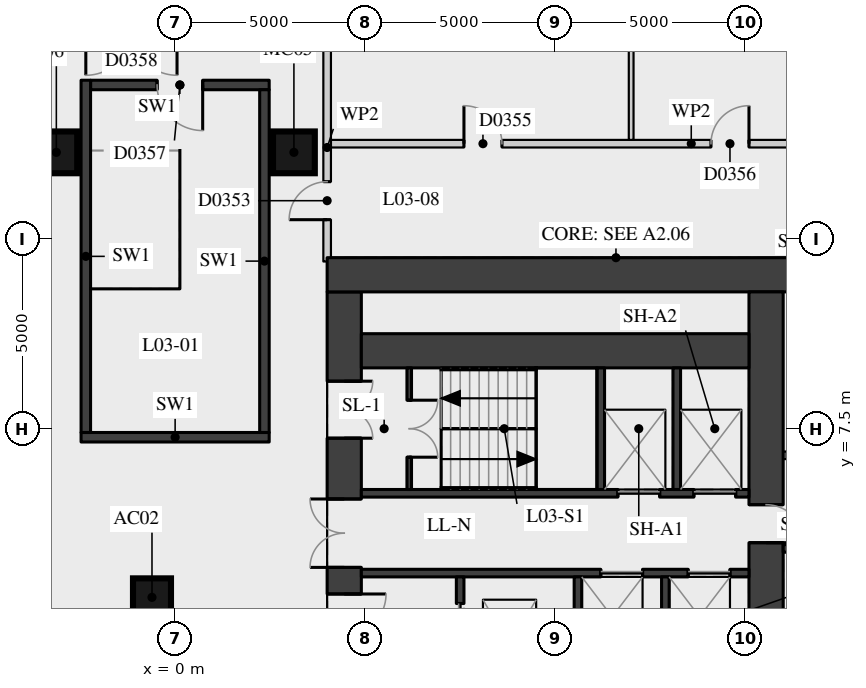
"""IFC4 building model, lengths in metres.
Left out: names, types, materials, properties, quantities, classifications, styles, units other than length and angle.
Written with IfcOpenShell. Run it as: python <this file> out.ifc"""

import sys

from ifc_helpers import new_model, si_unit, direction, frame, frame_2d, origin, origin_2d, place, context, subcontext, project, spatial, rectangle, extrude, element, fill, save


model = new_model("IFC4")
c1 = context("Model", 3, precision=1e-05, world=origin(), true_north=direction((0.0, 1.0)))
c2 = subcontext(c1, "Body", "Model", "MODEL_VIEW")
j1 = project(units=[si_unit("LENGTHUNIT", "METRE"), si_unit("PLANEANGLEUNIT", "RADIAN")], contexts=[c1])
p1 = place(None, origin())
s1 = spatial("IfcSite", under=j1, at=p1, CompositionType="ELEMENT")
p2 = place(p1, origin())
s2 = spatial("IfcBuilding", under=s1, at=p2, CompositionType="ELEMENT")
p3 = place(p2, frame((0.0, 0.0, 17.5)))
s3 = spatial("IfcBuildingStorey", under=s2, at=p3, CompositionType="ELEMENT", Elevation=17.5)
p4 = place(p3, frame((-0.609, 3.062, 0.0), z_axis=(0.0, 0.0, 1.0), x_axis=(1.0, 0.0, 0.0)))
e1 = element("IfcColumn", 1, at=p4, inside=s3, PredefinedType="COLUMN", context=c2, shape_type="SweptSolid", body=[
    extrude(rectangle(XDim=1.0, YDim=1.0, at=origin_2d()), origin(), (0.0, 0.0, 1.0), 4.2),
])
for number, where, z_axis, x_axis in (
    (2, (3.126, 14.772, 0.0), (0.0, 0.0, 1.0), (1.0, 0.0, 0.0)),
    (3, (-3.126, 14.772, 0.0), (0.0, 0.0, 1.0), (1.0, 0.0, 0.0)),
):
    element("IfcColumn", number, at=place(p3, frame(where, z_axis=z_axis, x_axis=x_axis)), inside=s3, PredefinedType="COLUMN", context=c2, shape_type="SweptSolid", body=[
        extrude(rectangle(XDim=1.1, YDim=1.1, at=origin_2d()), origin(), (0.0, 0.0, 1.0), 4.2),
    ])
p5 = place(p3, frame((4.45, -11.1, 0.0), z_axis=(0.0, 0.0, 1.0), x_axis=(0.0, 1.0, 0.0)))
e4 = element("IfcWall", 4, at=p5, inside=s3, PredefinedType="SHEAR", context=c2, shape_type="SweptSolid", body=[
    extrude(rectangle(XDim=22.2, YDim=0.9, at=frame_2d((11.1, 0.0))), origin(), (0.0, 0.0, 1.0), 3.92),
])
p6 = place(p5, frame((2.35, 0.0, 0.0)))
e5 = element("IfcOpeningElement", 5, at=p6, cuts=e4, PredefinedType="OPENING", context=c2, shape_type="SweptSolid", body=[
    extrude(rectangle(XDim=1.5, YDim=2.1, at=frame_2d((0.75, 1.05))), frame((0.0, 0.46, 0.0), z_axis=(0.0, -1.0, 0.0), x_axis=(1.0, 0.0, 0.0)), (0.0, 0.0, 1.0), 0.92),
])
p7 = place(p5, frame((5.45, 0.0, 0.0)))
e6 = element("IfcOpeningElement", 6, at=p7, cuts=e4, PredefinedType="OPENING", context=c2, shape_type="SweptSolid", body=[
    extrude(rectangle(XDim=1.8, YDim=2.1, at=frame_2d((0.9, 1.05))), frame((0.0, 0.46, 0.0), z_axis=(0.0, -1.0, 0.0), x_axis=(1.0, 0.0, 0.0)), (0.0, 0.0, 1.0), 0.92),
])
p8 = place(p5, frame((7.95, 0.0, 0.0)))
e7 = element("IfcOpeningElement", 7, at=p8, cuts=e4, PredefinedType="OPENING", context=c2, shape_type="SweptSolid", body=[
    extrude(rectangle(XDim=1.1, YDim=2.1, at=frame_2d((0.55, 1.05))), frame((0.0, 0.46, 0.0), z_axis=(0.0, -1.0, 0.0), x_axis=(1.0, 0.0, 0.0)), (0.0, 0.0, 1.0), 0.92),
])
p9 = place(p5, frame((10.6, 0.0, 0.0)))
e8 = element("IfcOpeningElement", 8, at=p9, cuts=e4, PredefinedType="OPENING", context=c2, shape_type="SweptSolid", body=[
    extrude(rectangle(XDim=1.0, YDim=2.1, at=frame_2d((0.5, 1.05))), frame((0.0, 0.46, 0.0), z_axis=(0.0, -1.0, 0.0), x_axis=(1.0, 0.0, 0.0)), (0.0, 0.0, 1.0), 0.92),
])
p10 = place(p5, frame((13.15, 0.0, 0.0)))
e9 = element("IfcOpeningElement", 9, at=p10, cuts=e4, PredefinedType="OPENING", context=c2, shape_type="SweptSolid", body=[
    extrude(rectangle(XDim=1.1, YDim=2.1, at=frame_2d((0.55, 1.05))), frame((0.0, 0.46, 0.0), z_axis=(0.0, -1.0, 0.0), x_axis=(1.0, 0.0, 0.0)), (0.0, 0.0, 1.0), 0.92),
])
p11 = place(p5, frame((14.95, 0.0, 0.0)))
e10 = element("IfcOpeningElement", 10, at=p11, cuts=e4, PredefinedType="OPENING", context=c2, shape_type="SweptSolid", body=[
    extrude(rectangle(XDim=1.8, YDim=2.1, at=frame_2d((0.9, 1.05))), frame((0.0, 0.46, 0.0), z_axis=(0.0, -1.0, 0.0), x_axis=(1.0, 0.0, 0.0)), (0.0, 0.0, 1.0), 0.92),
])
p12 = place(p5, frame((18.35, 0.0, 0.0)))
e11 = element("IfcOpeningElement", 11, at=p12, cuts=e4, PredefinedType="OPENING", context=c2, shape_type="SweptSolid", body=[
    extrude(rectangle(XDim=1.5, YDim=2.1, at=frame_2d((0.75, 1.05))), frame((0.0, 0.46, 0.0), z_axis=(0.0, -1.0, 0.0), x_axis=(1.0, 0.0, 0.0)), (0.0, 0.0, 1.0), 0.92),
])
p13 = place(p3, frame((4.0, 11.55, 0.0), z_axis=(0.0, 0.0, 1.0), x_axis=(1.0, 0.0, 0.0)))
e12 = element("IfcWall", 12, at=p13, inside=s3, PredefinedType="SHEAR", context=c2, shape_type="SweptSolid", body=[
    extrude(rectangle(XDim=15.2, YDim=0.9, at=frame_2d((7.6, 0.0))), origin(), (0.0, 0.0, 1.0), 3.92),
])
p14 = place(p3, frame((15.55, -11.1, 0.0), z_axis=(0.0, 0.0, 1.0), x_axis=(0.0, 1.0, 0.0)))
e13 = element("IfcWall", 13, at=p14, inside=s3, PredefinedType="SHEAR", context=c2, shape_type="SweptSolid", body=[
    extrude(rectangle(XDim=22.2, YDim=0.9, at=frame_2d((11.1, 0.0))), origin(), (0.0, 0.0, 1.0), 3.92),
])
p15 = place(p14, frame((15.6, 0.0, 0.0)))
e14 = element("IfcOpeningElement", 14, at=p15, cuts=e13, PredefinedType="OPENING", context=c2, shape_type="SweptSolid", body=[
    extrude(rectangle(XDim=1.0, YDim=2.1, at=frame_2d((0.5, 1.05))), frame((0.0, 0.46, 0.0), z_axis=(0.0, -1.0, 0.0), x_axis=(1.0, 0.0, 0.0)), (0.0, 0.0, 1.0), 0.92),
])
p16 = place(p14, frame((5.6, 0.0, 0.0)))
e15 = element("IfcOpeningElement", 15, at=p16, cuts=e13, PredefinedType="OPENING", context=c2, shape_type="SweptSolid", body=[
    extrude(rectangle(XDim=1.0, YDim=2.1, at=frame_2d((0.5, 1.05))), frame((0.0, 0.46, 0.0), z_axis=(0.0, -1.0, 0.0), x_axis=(1.0, 0.0, 0.0)), (0.0, 0.0, 1.0), 0.92),
])
p17 = place(p3, frame((4.9, 9.55, 0.0), z_axis=(0.0, 0.0, 1.0), x_axis=(1.0, 0.0, 0.0)))
e16 = element("IfcWall", 16, at=p17, inside=s3, PredefinedType="SHEAR", context=c2, shape_type="SweptSolid", body=[
    extrude(rectangle(XDim=10.2, YDim=0.9, at=frame_2d((5.1, 0.0))), origin(), (0.0, 0.0, 1.0), 3.92),
])
p18 = place(p3, frame((4.9, 5.8, 0.0), z_axis=(0.0, 0.0, 1.0), x_axis=(1.0, 0.0, 0.0)))
e17 = element("IfcWall", 17, at=p18, inside=s3, PredefinedType="SHEAR", context=c2, shape_type="SweptSolid", body=[
    extrude(rectangle(XDim=10.2, YDim=0.2, at=frame_2d((5.1, 0.0))), origin(), (0.0, 0.0, 1.0), 3.92),
])
p19 = place(p18, frame((6.75, 0.0, 0.0)))
e18 = element("IfcOpeningElement", 18, at=p19, cuts=e17, PredefinedType="OPENING", context=c2, shape_type="SweptSolid", body=[
    extrude(rectangle(XDim=1.1, YDim=2.1, at=frame_2d((0.55, 1.05))), frame((0.0, 0.11, 0.0), z_axis=(0.0, -1.0, 0.0), x_axis=(1.0, 0.0, 0.0)), (0.0, 0.0, 1.0), 0.22),
])
p20 = place(p18, frame((8.75, 0.0, 0.0)))
e19 = element("IfcOpeningElement", 19, at=p20, cuts=e17, PredefinedType="OPENING", context=c2, shape_type="SweptSolid", body=[
    extrude(rectangle(XDim=1.1, YDim=2.1, at=frame_2d((0.55, 1.05))), frame((0.0, 0.11, 0.0), z_axis=(0.0, -1.0, 0.0), x_axis=(1.0, 0.0, 0.0)), (0.0, 0.0, 1.0), 0.22),
])
p21 = place(p3, frame((4.9, 3.7, 0.0), z_axis=(0.0, 0.0, 1.0), x_axis=(1.0, 0.0, 0.0)))
e20 = element("IfcWall", 20, at=p21, inside=s3, PredefinedType="SHEAR", context=c2, shape_type="SweptSolid", body=[
    extrude(rectangle(XDim=10.2, YDim=0.2, at=frame_2d((5.1, 0.0))), origin(), (0.0, 0.0, 1.0), 3.92),
])
p22 = place(p21, frame((6.3, 0.0, 0.0)))
e21 = element("IfcOpeningElement", 21, at=p22, cuts=e20, PredefinedType="OPENING", context=c2, shape_type="SweptSolid", body=[
    extrude(rectangle(XDim=1.1, YDim=2.1, at=frame_2d((0.55, 1.05))), frame((0.0, 0.11, 0.0), z_axis=(0.0, -1.0, 0.0), x_axis=(1.0, 0.0, 0.0)), (0.0, 0.0, 1.0), 0.22),
])
p23 = place(p21, frame((8.6, 0.0, 0.0)))
e22 = element("IfcOpeningElement", 22, at=p23, cuts=e20, PredefinedType="OPENING", context=c2, shape_type="SweptSolid", body=[
    extrude(rectangle(XDim=1.1, YDim=2.1, at=frame_2d((0.55, 1.05))), frame((0.0, 0.11, 0.0), z_axis=(0.0, -1.0, 0.0), x_axis=(1.0, 0.0, 0.0)), (0.0, 0.0, 1.0), 0.22),
])
for number, where, z_axis, x_axis in (
    (23, (11.2, 5.9, 0.0), (0.0, 0.0, 1.0), (0.0, 1.0, 0.0)),
    (24, (13.2, 5.9, 0.0), (0.0, 0.0, 1.0), (0.0, 1.0, 0.0)),
):
    element("IfcWall", number, at=place(p3, frame(where, z_axis=z_axis, x_axis=x_axis)), inside=s3, PredefinedType="SHEAR", context=c2, shape_type="SweptSolid", body=[
        extrude(rectangle(XDim=3.2, YDim=0.2, at=frame_2d((1.6, 0.0))), origin(), (0.0, 0.0, 1.0), 3.92),
    ])
p24 = place(p3, frame((7.5, 1.1, 0.0), z_axis=(0.0, 0.0, 1.0), x_axis=(0.0, 1.0, 0.0)))
e25 = element("IfcWall", 25, at=p24, inside=s3, PredefinedType="SHEAR", context=c2, shape_type="SweptSolid", body=[
    extrude(rectangle(XDim=2.5, YDim=0.2, at=frame_2d((1.25, 0.0))), origin(), (0.0, 0.0, 1.0), 3.92),
])
p25 = place(p24, frame((0.7, 0.0, 0.0)))
e26 = element("IfcOpeningElement", 26, at=p25, cuts=e25, PredefinedType="OPENING", context=c2, shape_type="SweptSolid", body=[
    extrude(rectangle(XDim=1.1, YDim=2.1, at=frame_2d((0.55, 1.05))), frame((0.0, 0.11, 0.0), z_axis=(0.0, -1.0, 0.0), x_axis=(1.0, 0.0, 0.0)), (0.0, 0.0, 1.0), 0.22),
])
for number, where, z_axis, x_axis in (
    (27, (10.6, 1.1, 0.0), (0.0, 0.0, 1.0), (0.0, 1.0, 0.0)),
    (28, (12.9, 1.1, 0.0), (0.0, 0.0, 1.0), (0.0, 1.0, 0.0)),
):
    element("IfcWall", number, at=place(p3, frame(where, z_axis=z_axis, x_axis=x_axis)), inside=s3, PredefinedType="SHEAR", context=c2, shape_type="SweptSolid", body=[
        extrude(rectangle(XDim=2.5, YDim=0.2, at=frame_2d((1.25, 0.0))), origin(), (0.0, 0.0, 1.0), 3.92),
    ])
p26 = place(p3, frame((6.16, 5.9, 0.0), z_axis=(0.0, 0.0, 1.0), x_axis=(0.0, 1.0, 0.0)))
e29 = element("IfcWall", 29, at=p26, inside=s3, PredefinedType="SHEAR", context=c2, shape_type="SweptSolid", body=[
    extrude(rectangle(XDim=3.2, YDim=0.12, at=frame_2d((1.6, 0.0))), origin(), (0.0, 0.0, 1.0), 3.92),
])
p27 = place(p26, frame((0.85, 0.0, 0.0)))
e30 = element("IfcOpeningElement", 30, at=p27, cuts=e29, PredefinedType="OPENING", context=c2, shape_type="SweptSolid", body=[
    extrude(rectangle(XDim=1.5, YDim=2.1, at=frame_2d((0.75, 1.05))), frame((0.0, 0.07, 0.0), z_axis=(0.0, -1.0, 0.0), x_axis=(1.0, 0.0, 0.0)), (0.0, 0.0, 1.0), 0.14),
])
p28 = place(p3, frame((16.0, 4.35, 0.0), z_axis=(0.0, 0.0, 1.0), x_axis=(1.0, 0.0, 0.0)))
e31 = element("IfcWall", 31, at=p28, inside=s3, PredefinedType="SHEAR", context=c2, shape_type="SweptSolid", body=[
    extrude(rectangle(XDim=2.3, YDim=0.2, at=frame_2d((1.15, 0.0))), origin(), (0.0, 0.0, 1.0), 3.92),
])
p29 = place(p3, frame((16.0, 6.8, 0.0), z_axis=(0.0, 0.0, 1.0), x_axis=(1.0, 0.0, 0.0)))
e32 = element("IfcWall", 32, at=p29, inside=s3, PredefinedType="PARTITIONING", context=c2, shape_type="SweptSolid", body=[
    extrude(rectangle(XDim=2.3, YDim=0.2, at=frame_2d((1.15, 0.0))), origin(), (0.0, 0.0, 1.0), 3.92),
])
p30 = place(p29, frame((0.1, 0.0, 0.0)))
e33 = element("IfcOpeningElement", 33, at=p30, cuts=e32, PredefinedType="OPENING", context=c2, shape_type="SweptSolid", body=[
    extrude(rectangle(XDim=0.9, YDim=2.1, at=frame_2d((0.45, 1.05))), frame((0.0, 0.11, 0.0), z_axis=(0.0, -1.0, 0.0), x_axis=(1.0, 0.0, 0.0)), (0.0, 0.0, 1.0), 0.22),
])
p31 = place(p3, frame((-2.475, 7.275, 0.0), z_axis=(0.0, 0.0, 1.0), x_axis=(1.0, 0.0, 0.0)))
e34 = element("IfcWall", 34, at=p31, inside=s3, PredefinedType="SOLIDWALL", context=c2, shape_type="SweptSolid", body=[
    extrude(rectangle(XDim=4.95, YDim=0.25, at=frame_2d((2.475, 0.0))), origin(), (0.0, 0.0, 1.0), 3.92),
])
p32 = place(p3, frame((4.1, 15.0, 0.0), z_axis=(0.0, 0.0, 1.0), x_axis=(1.0, 0.0, 0.0)))
e35 = element("IfcWall", 35, at=p32, inside=s3, PredefinedType="PARTITIONING", context=c2, shape_type="SweptSolid", body=[
    extrude(rectangle(XDim=18.962, YDim=0.2, at=frame_2d((9.481, 0.0))), origin(), (0.0, 0.0, 1.0), 3.92),
])
p33 = place(p32, frame((3.5, 0.0, 0.0)))
e36 = element("IfcOpeningElement", 36, at=p33, cuts=e35, PredefinedType="OPENING", context=c2, shape_type="SweptSolid", body=[
    extrude(rectangle(XDim=1.0, YDim=2.1, at=frame_2d((0.5, 1.05))), frame((0.0, 0.11, 0.0), z_axis=(0.0, -1.0, 0.0), x_axis=(1.0, 0.0, 0.0)), (0.0, 0.0, 1.0), 0.22),
])
p34 = place(p32, frame((10.0, 0.0, 0.0)))
e37 = element("IfcOpeningElement", 37, at=p34, cuts=e35, PredefinedType="OPENING", context=c2, shape_type="SweptSolid", body=[
    extrude(rectangle(XDim=1.0, YDim=2.1, at=frame_2d((0.5, 1.05))), frame((0.0, 0.11, 0.0), z_axis=(0.0, -1.0, 0.0), x_axis=(1.0, 0.0, 0.0)), (0.0, 0.0, 1.0), 0.22),
])
p35 = place(p3, frame((-2.225, 16.545, 0.0), z_axis=(0.0, 0.0, 1.0), x_axis=(1.0, 0.0, 0.0)))
e38 = element("IfcWall", 38, at=p35, inside=s3, PredefinedType="SOLIDWALL", context=c2, shape_type="SweptSolid", body=[
    extrude(rectangle(XDim=4.7, YDim=0.25, at=frame_2d((2.35, 0.0))), origin(), (0.0, 0.0, 1.0), 3.92),
])
p36 = place(p35, frame((1.75, 0.0, 0.0)))
e39 = element("IfcOpeningElement", 39, at=p36, cuts=e38, PredefinedType="OPENING", context=c2, shape_type="SweptSolid", body=[
    extrude(rectangle(XDim=1.2, YDim=2.1, at=frame_2d((0.6, 1.05))), frame((0.0, 0.135, 0.0), z_axis=(0.0, -1.0, 0.0), x_axis=(1.0, 0.0, 0.0)), (0.0, 0.0, 1.0), 0.27),
])
p37 = place(p3, frame((-2.35, 7.4, 0.0), z_axis=(0.0, 0.0, 1.0), x_axis=(0.0, 1.0, 0.0)))
e40 = element("IfcWall", 40, at=p37, inside=s3, PredefinedType="SOLIDWALL", context=c2, shape_type="SweptSolid", body=[
    extrude(rectangle(XDim=9.27, YDim=0.25, at=frame_2d((4.635, 0.0))), origin(), (0.0, 0.0, 1.0), 3.92),
])
p38 = place(p3, frame((2.35, 7.4, 0.0), z_axis=(0.0, 0.0, 1.0), x_axis=(0.0, 1.0, 0.0)))
e41 = element("IfcWall", 41, at=p38, inside=s3, PredefinedType="SOLIDWALL", context=c2, shape_type="SweptSolid", body=[
    extrude(rectangle(XDim=9.02, YDim=0.25, at=frame_2d((4.51, 0.0))), origin(), (0.0, 0.0, 1.0), 3.92),
])
p39 = place(p3, frame((4.0, 11.9, 0.0), z_axis=(0.0, 0.0, 1.0), x_axis=(0.0, 1.0, 0.0)))
e42 = element("IfcWall", 42, at=p39, inside=s3, PredefinedType="PARTITIONING", context=c2, shape_type="SweptSolid", body=[
    extrude(rectangle(XDim=6.0, YDim=0.2, at=frame_2d((3.0, 0.0))), origin(), (0.0, 0.0, 1.0), 3.92),
])
p40 = place(p39, frame((1.1, 0.0, 0.0)))
e43 = element("IfcOpeningElement", 43, at=p40, cuts=e42, PredefinedType="OPENING", context=c2, shape_type="SweptSolid", body=[
    extrude(rectangle(XDim=1.0, YDim=2.1, at=frame_2d((0.5, 1.05))), frame((0.0, 0.11, 0.0), z_axis=(0.0, -1.0, 0.0), x_axis=(1.0, 0.0, 0.0)), (0.0, 0.0, 1.0), 0.22),
])
p41 = place(p3, frame((12.0, 15.1, 0.0), z_axis=(0.0, 0.0, 1.0), x_axis=(0.0, 1.0, 0.0)))
e44 = element("IfcWall", 44, at=p41, inside=s3, PredefinedType="PARTITIONING", context=c2, shape_type="SweptSolid", body=[
    extrude(rectangle(XDim=8.002, YDim=0.125, at=frame_2d((4.001, 0.0))), origin(), (0.0, 0.0, 1.0), 3.92),
])
p42 = place(p10, origin())
e45 = element("IfcDoor", 45, at=p42, inside=s3, OperationType="SINGLE_SWING_LEFT", PredefinedType="DOOR", context=c2, shape_type="SweptSolid", body=[
    extrude(rectangle(XDim=1.1, YDim=2.1, at=frame_2d((0.55, 1.05))), frame((0.0, 0.025, 0.0), z_axis=(0.0, -1.0, 0.0), x_axis=(1.0, 0.0, 0.0)), (0.0, 0.0, 1.0), 0.05),
])
fill(e9, e45)
p43 = place(p11, origin())
e46 = element("IfcDoor", 46, at=p43, inside=s3, OperationType="DOUBLE_DOOR_SINGLE_SWING", PredefinedType="DOOR", context=c2, shape_type="SweptSolid", body=[
    extrude(rectangle(XDim=1.8, YDim=2.1, at=frame_2d((0.9, 1.05))), frame((0.0, 0.025, 0.0), z_axis=(0.0, -1.0, 0.0), x_axis=(1.0, 0.0, 0.0)), (0.0, 0.0, 1.0), 0.05),
])
fill(e10, e46)
p44 = place(p12, origin())
e47 = element("IfcDoor", 47, at=p44, inside=s3, OperationType="DOUBLE_DOOR_SINGLE_SWING", PredefinedType="DOOR", context=c2, shape_type="SweptSolid", body=[
    extrude(rectangle(XDim=1.5, YDim=2.1, at=frame_2d((0.75, 1.05))), frame((0.0, 0.025, 0.0), z_axis=(0.0, -1.0, 0.0), x_axis=(1.0, 0.0, 0.0)), (0.0, 0.0, 1.0), 0.05),
])
fill(e11, e47)
p45 = place(p27, origin())
e48 = element("IfcDoor", 48, at=p45, inside=s3, OperationType="DOUBLE_DOOR_SINGLE_SWING", PredefinedType="DOOR", context=c2, shape_type="SweptSolid", body=[
    extrude(rectangle(XDim=1.5, YDim=2.1, at=frame_2d((0.75, 1.05))), frame((0.0, 0.025, 0.0), z_axis=(0.0, -1.0, 0.0), x_axis=(1.0, 0.0, 0.0)), (0.0, 0.0, 1.0), 0.05),
])
fill(e30, e48)
p46 = place(p19, origin())
e49 = element("IfcDoor", 49, at=p46, inside=s3, OperationType="DOUBLE_DOOR_SLIDING", PredefinedType="DOOR", context=c2, shape_type="SweptSolid", body=[
    extrude(rectangle(XDim=1.1, YDim=2.1, at=frame_2d((0.55, 1.05))), frame((0.0, 0.025, 0.0), z_axis=(0.0, -1.0, 0.0), x_axis=(1.0, 0.0, 0.0)), (0.0, 0.0, 1.0), 0.05),
])
fill(e18, e49)
p47 = place(p20, origin())
e50 = element("IfcDoor", 50, at=p47, inside=s3, OperationType="DOUBLE_DOOR_SLIDING", PredefinedType="DOOR", context=c2, shape_type="SweptSolid", body=[
    extrude(rectangle(XDim=1.1, YDim=2.1, at=frame_2d((0.55, 1.05))), frame((0.0, 0.025, 0.0), z_axis=(0.0, -1.0, 0.0), x_axis=(1.0, 0.0, 0.0)), (0.0, 0.0, 1.0), 0.05),
])
fill(e19, e50)
p48 = place(p22, origin())
e51 = element("IfcDoor", 51, at=p48, inside=s3, OperationType="DOUBLE_DOOR_SLIDING", PredefinedType="DOOR", context=c2, shape_type="SweptSolid", body=[
    extrude(rectangle(XDim=1.1, YDim=2.1, at=frame_2d((0.55, 1.05))), frame((0.0, 0.025, 0.0), z_axis=(0.0, -1.0, 0.0), x_axis=(1.0, 0.0, 0.0)), (0.0, 0.0, 1.0), 0.05),
])
fill(e21, e51)
p49 = place(p23, origin())
e52 = element("IfcDoor", 52, at=p49, inside=s3, OperationType="DOUBLE_DOOR_SLIDING", PredefinedType="DOOR", context=c2, shape_type="SweptSolid", body=[
    extrude(rectangle(XDim=1.1, YDim=2.1, at=frame_2d((0.55, 1.05))), frame((0.0, 0.025, 0.0), z_axis=(0.0, -1.0, 0.0), x_axis=(1.0, 0.0, 0.0)), (0.0, 0.0, 1.0), 0.05),
])
fill(e22, e52)
p50 = place(p25, origin())
e53 = element("IfcDoor", 53, at=p50, inside=s3, OperationType="DOUBLE_DOOR_SLIDING", PredefinedType="DOOR", context=c2, shape_type="SweptSolid", body=[
    extrude(rectangle(XDim=1.1, YDim=2.1, at=frame_2d((0.55, 1.05))), frame((0.0, 0.025, 0.0), z_axis=(0.0, -1.0, 0.0), x_axis=(1.0, 0.0, 0.0)), (0.0, 0.0, 1.0), 0.05),
])
fill(e26, e53)
p51 = place(p15, origin())
e54 = element("IfcDoor", 54, at=p51, inside=s3, OperationType="SINGLE_SWING_RIGHT", PredefinedType="DOOR", context=c2, shape_type="SweptSolid", body=[
    extrude(rectangle(XDim=1.0, YDim=2.1, at=frame_2d((0.5, 1.05))), frame((0.0, 0.025, 0.0), z_axis=(0.0, -1.0, 0.0), x_axis=(1.0, 0.0, 0.0)), (0.0, 0.0, 1.0), 0.05),
])
fill(e14, e54)
p52 = place(p40, origin())
e55 = element("IfcDoor", 55, at=p52, inside=s3, OperationType="SINGLE_SWING_LEFT", PredefinedType="DOOR", context=c2, shape_type="SweptSolid", body=[
    extrude(rectangle(XDim=1.0, YDim=2.1, at=frame_2d((0.5, 1.05))), frame((0.0, 0.025, 0.0), z_axis=(0.0, -1.0, 0.0), x_axis=(1.0, 0.0, 0.0)), (0.0, 0.0, 1.0), 0.05),
])
fill(e43, e55)
p53 = place(p33, origin())
e56 = element("IfcDoor", 56, at=p53, inside=s3, OperationType="SINGLE_SWING_LEFT", PredefinedType="DOOR", context=c2, shape_type="SweptSolid", body=[
    extrude(rectangle(XDim=1.0, YDim=2.1, at=frame_2d((0.5, 1.05))), frame((0.0, 0.025, 0.0), z_axis=(0.0, -1.0, 0.0), x_axis=(1.0, 0.0, 0.0)), (0.0, 0.0, 1.0), 0.05),
])
fill(e36, e56)
p54 = place(p34, origin())
e57 = element("IfcDoor", 57, at=p54, inside=s3, OperationType="SINGLE_SWING_RIGHT", PredefinedType="DOOR", context=c2, shape_type="SweptSolid", body=[
    extrude(rectangle(XDim=1.0, YDim=2.1, at=frame_2d((0.5, 1.05))), frame((0.0, 0.025, 0.0), z_axis=(0.0, -1.0, 0.0), x_axis=(1.0, 0.0, 0.0)), (0.0, 0.0, 1.0), 0.05),
])
fill(e37, e57)
p55 = place(p36, origin())
e58 = element("IfcDoor", 58, at=p55, inside=s3, OperationType="SINGLE_SWING_LEFT", PredefinedType="DOOR", context=c2, shape_type="SweptSolid", body=[
    extrude(rectangle(XDim=1.2, YDim=2.1, at=frame_2d((0.6, 1.05))), frame((0.0, 0.025, 0.0), z_axis=(0.0, -1.0, 0.0), x_axis=(1.0, 0.0, 0.0)), (0.0, 0.0, 1.0), 0.05),
])
fill(e39, e58)
save(model, sys.argv[1])
